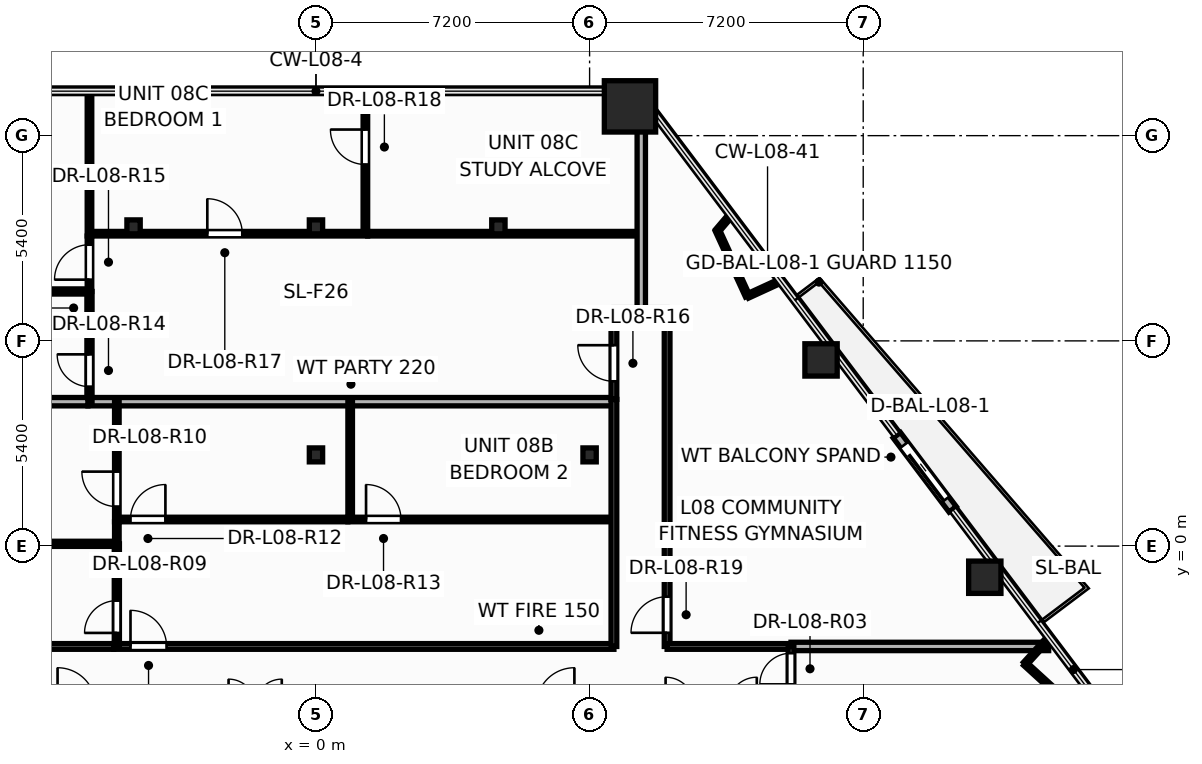
"""IFC4 building model, lengths in metres.
Left out: names, types, materials, properties, quantities, classifications, styles, units other than length and angle.
Written with IfcOpenShell. Run it as: python <this file> out.ifc"""

import sys

from ifc_helpers import new_model, si_unit, direction, frame, frame_2d, origin, origin_2d, place, context, subcontext, project, spatial, rectangle, hollow_rectangle, hollow_circle, i_section, extrude, element, fill, save


model = new_model("IFC4")
c1 = context("Model", 3, precision=1e-05, world=origin(), true_north=direction((0.0, 1.0)))
c2 = subcontext(c1, "Body", "Model", "MODEL_VIEW")
j1 = project(units=[si_unit("LENGTHUNIT", "METRE"), si_unit("PLANEANGLEUNIT", "RADIAN")], contexts=[c1])
p1 = place(None, origin())
s1 = spatial("IfcSite", under=j1, at=p1, CompositionType="ELEMENT")
p2 = place(p1, origin())
s2 = spatial("IfcBuilding", under=s1, at=p2, CompositionType="ELEMENT")
p3 = place(p2, frame((0.0, 0.0, 35.1)))
s3 = spatial("IfcBuildingStorey", under=s2, at=p3, CompositionType="ELEMENT", Elevation=35.1)
p4 = place(p3, frame((8.263, 11.57, 0.0), z_axis=(0.0, 0.0, 1.0), x_axis=(1.0, 0.0, 0.0)))
e1 = element("IfcColumn", 1, at=p4, inside=s3, PredefinedType="COLUMN", context=c2, shape_type="SweptSolid", body=[
    extrude(hollow_rectangle(XDim=1.35, YDim=1.35, WallThickness=0.065, at=origin_2d()), origin(), (0.0, 0.0, 1.0), 3.6),
])
for number, where, z_axis, x_axis in (
    (2, (17.599, -0.819, 0.0), (0.0, 0.0, 1.0), (1.0, 0.0, 0.0)),
    (3, (13.29, 4.899, 0.0), (0.0, 0.0, 1.0), (1.0, 0.0, 0.0)),
):
    element("IfcColumn", number, at=place(p3, frame(where, z_axis=z_axis, x_axis=x_axis)), inside=s3, PredefinedType="COLUMN", context=c2, shape_type="SweptSolid", body=[
        extrude(hollow_circle(Radius=0.425, WallThickness=0.038, at=origin_2d()), origin(), (0.0, 0.0, 1.0), 3.6),
    ])
for number, where, z_axis, x_axis in (
    (4, (0.0, 2.4, 0.0), (0.0, 0.0, 1.0), (1.0, 0.0, 0.0)),
    (5, (7.2, 2.4, 0.0), (0.0, 0.0, 1.0), (1.0, 0.0, 0.0)),
    (6, (-4.8, 8.4, 0.0), (0.0, 0.0, 1.0), (1.0, 0.0, 0.0)),
    (7, (0.0, 8.4, 0.0), (0.0, 0.0, 1.0), (1.0, 0.0, 0.0)),
    (8, (4.8, 8.4, 0.0), (0.0, 0.0, 1.0), (1.0, 0.0, 0.0)),
):
    element("IfcColumn", number, at=place(p3, frame(where, z_axis=z_axis, x_axis=x_axis)), inside=s3, PredefinedType="COLUMN", context=c2, shape_type="SweptSolid", body=[
        extrude(i_section(OverallWidth=0.35, OverallDepth=0.367, WebThickness=0.025, FlangeThickness=0.032, at=origin_2d()), origin(), (0.0, 0.0, 1.0), 3.6),
    ])
p5 = place(p3, frame((16.753, 0.969, -0.015), z_axis=(0.0, 0.0, 1.0), x_axis=(-0.601871511513, 0.798592939882, 0.0)))
e9 = element("IfcWall", 9, at=p5, inside=s3, PredefinedType="STANDARD", context=c2, shape_type="SweptSolid", body=[
    extrude(rectangle(XDim=2.44, YDim=0.24, at=frame_2d((1.22, 0.0))), origin(), (0.0, 0.0, 1.0), 2.729),
])
p6 = place(p5, frame((0.32, 0.0, 0.015)))
e10 = element("IfcOpeningElement", 10, at=p6, cuts=e9, PredefinedType="OPENING", context=c2, shape_type="SweptSolid", body=[
    extrude(rectangle(XDim=1.806, YDim=2.204, at=frame_2d((0.9, 1.102))), frame((0.0, 0.13, 0.0), z_axis=(0.0, -1.0, 0.0), x_axis=(1.0, 0.0, 0.0)), (0.0, 0.0, 1.0), 0.26),
])
p7 = place(p3, frame((-5.32, -2.64, 0.0), z_axis=(0.0, 0.0, 1.0), x_axis=(1.0, 0.0, 0.0)))
e11 = element("IfcWall", 11, at=p7, inside=s3, PredefinedType="PARTITIONING", context=c2, shape_type="SweptSolid", body=[
    extrude(rectangle(XDim=13.16, YDim=0.15, at=frame_2d((6.58, 0.0))), origin(), (0.0, 0.0, 1.0), 2.325),
])
p8 = place(p7, frame((0.439, 0.0, 0.0)))
e12 = element("IfcOpeningElement", 12, at=p8, cuts=e11, PredefinedType="OPENING", context=c2, shape_type="SweptSolid", body=[
    extrude(rectangle(XDim=0.956, YDim=2.104, at=frame_2d((0.475, 1.052))), frame((0.0, 0.085, 0.0), z_axis=(0.0, -1.0, 0.0), x_axis=(1.0, 0.0, 0.0)), (0.0, 0.0, 1.0), 0.17),
])
p9 = place(p3, frame((9.24, -2.64, 0.0), z_axis=(0.0, 0.0, 1.0), x_axis=(0.0, 1.0, 0.0)))
e13 = element("IfcWall", 13, at=p9, inside=s3, PredefinedType="PARTITIONING", context=c2, shape_type="SweptSolid", body=[
    extrude(rectangle(XDim=8.84, YDim=0.15, at=frame_2d((4.42, 0.0))), origin(), (0.0, 0.0, 1.0), 2.325),
])
p10 = place(p9, frame((0.359, 0.0, 0.0)))
e14 = element("IfcOpeningElement", 14, at=p10, cuts=e13, PredefinedType="OPENING", context=c2, shape_type="SweptSolid", body=[
    extrude(rectangle(XDim=0.956, YDim=2.104, at=frame_2d((0.475, 1.052))), frame((0.0, 0.085, 0.0), z_axis=(0.0, -1.0, 0.0), x_axis=(1.0, 0.0, 0.0)), (0.0, 0.0, 1.0), 0.17),
])
p11 = place(p3, frame((-5.96, 8.22, 0.0), z_axis=(0.0, 0.0, 1.0), x_axis=(1.0, 0.0, 0.0)))
e15 = element("IfcWall", 15, at=p11, inside=s3, PredefinedType="PARTITIONING", context=c2, shape_type="SweptSolid", body=[
    extrude(rectangle(XDim=7.32, YDim=0.12, at=frame_2d((3.66, 0.0))), origin(), (0.0, 0.0, 1.0), 2.325),
])
p12 = place(p11, frame((3.101, 0.0, 0.0)))
e16 = element("IfcOpeningElement", 16, at=p12, cuts=e15, PredefinedType="OPENING", context=c2, shape_type="SweptSolid", body=[
    extrude(rectangle(XDim=0.926, YDim=2.104, at=frame_2d((0.46, 1.052))), frame((0.0, 0.07, 0.0), z_axis=(0.0, -1.0, 0.0), x_axis=(1.0, 0.0, 0.0)), (0.0, 0.0, 1.0), 0.14),
])
p13 = place(p3, frame((1.362, 8.22, 0.0), z_axis=(0.0, 0.0, 1.0), x_axis=(1.0, 0.0, 0.0)))
e17 = element("IfcWall", 17, at=p13, inside=s3, PredefinedType="PARTITIONING", context=c2, shape_type="SweptSolid", body=[
    extrude(rectangle(XDim=7.198, YDim=0.12, at=frame_2d((3.599, 0.0))), origin(), (0.0, 0.0, 1.0), 2.325),
])
p14 = place(p3, frame((0.84, 0.7, 0.0), z_axis=(0.0, 0.0, 1.0), x_axis=(1.0, 0.0, 0.0)))
e18 = element("IfcWall", 18, at=p14, inside=s3, PredefinedType="PARTITIONING", context=c2, shape_type="SweptSolid", body=[
    extrude(rectangle(XDim=7.0, YDim=0.12, at=frame_2d((3.5, 0.0))), origin(), (0.0, 0.0, 1.0), 2.325),
])
p15 = place(p14, frame((0.478, 0.0, 0.0)))
e19 = element("IfcOpeningElement", 19, at=p15, cuts=e18, PredefinedType="OPENING", context=c2, shape_type="SweptSolid", body=[
    extrude(rectangle(XDim=0.926, YDim=2.104, at=frame_2d((0.46, 1.052))), frame((0.0, 0.07, 0.0), z_axis=(0.0, -1.0, 0.0), x_axis=(1.0, 0.0, 0.0)), (0.0, 0.0, 1.0), 0.14),
])
p16 = place(p3, frame((-6.0, 3.8, 0.0), z_axis=(0.0, 0.0, 1.0), x_axis=(1.0, 0.0, 0.0)))
e20 = element("IfcWall", 20, at=p16, inside=s3, PredefinedType="PARTITIONING", context=c2, shape_type="SweptSolid", body=[
    extrude(rectangle(XDim=13.84, YDim=0.22, at=frame_2d((6.92, 0.0))), origin(), (0.0, 0.0, 1.0), 2.325),
])
p17 = place(p3, frame((12.5, -2.64, 0.0), z_axis=(0.0, 0.0, 1.0), x_axis=(1.0, 0.0, 0.0)))
e21 = element("IfcWall", 21, at=p17, inside=s3, PredefinedType="PARTITIONING", context=c2, shape_type="SweptSolid", body=[
    extrude(rectangle(XDim=6.78, YDim=0.22, at=frame_2d((3.39, 0.0))), origin(), (0.0, 0.0, 1.0), 2.713),
])
p18 = place(p3, frame((-5.24, 0.7, 0.0), z_axis=(0.0, 0.0, 1.0), x_axis=(1.0, 0.0, 0.0)))
e22 = element("IfcWall", 22, at=p18, inside=s3, PredefinedType="PARTITIONING", context=c2, shape_type="SweptSolid", body=[
    extrude(rectangle(XDim=6.078, YDim=0.12, at=frame_2d((3.039, 0.0))), origin(), (0.0, 0.0, 1.0), 2.325),
])
p19 = place(p18, frame((0.358, 0.0, 0.0)))
e23 = element("IfcOpeningElement", 23, at=p19, cuts=e22, PredefinedType="OPENING", context=c2, shape_type="SweptSolid", body=[
    extrude(rectangle(XDim=0.926, YDim=2.104, at=frame_2d((0.46, 1.052))), frame((0.0, 0.07, 0.0), z_axis=(0.0, -1.0, 0.0), x_axis=(1.0, 0.0, 0.0)), (0.0, 0.0, 1.0), 0.14),
])
p20 = place(p3, frame((-5.96, 8.16, 0.0), z_axis=(0.0, 0.0, 1.0), x_axis=(0.0, 1.0, 0.0)))
e24 = element("IfcWall", 24, at=p20, inside=s3, PredefinedType="PARTITIONING", context=c2, shape_type="SweptSolid", body=[
    extrude(rectangle(XDim=3.811, YDim=0.12, at=frame_2d((1.905, 0.0))), origin(), (0.0, 0.0, 1.0), 2.325),
])
p21 = place(p3, frame((1.3, 8.22, 0.0), z_axis=(0.0, 0.0, 1.0), x_axis=(0.0, 1.0, 0.0)))
e25 = element("IfcWall", 25, at=p21, inside=s3, PredefinedType="PARTITIONING", context=c2, shape_type="SweptSolid", body=[
    extrude(rectangle(XDim=3.75, YDim=0.12, at=frame_2d((1.875, 0.0))), origin(), (0.0, 0.0, 1.0), 2.325),
])
p22 = place(p21, frame((1.821, 0.0, 0.0)))
e26 = element("IfcOpeningElement", 26, at=p22, cuts=e25, PredefinedType="OPENING", context=c2, shape_type="SweptSolid", body=[
    extrude(rectangle(XDim=0.926, YDim=2.104, at=frame_2d((0.46, 1.052))), frame((0.0, 0.07, 0.0), z_axis=(0.0, -1.0, 0.0), x_axis=(1.0, 0.0, 0.0)), (0.0, 0.0, 1.0), 0.14),
])
p23 = place(p3, frame((8.56, 6.2, 0.0), z_axis=(0.0, 0.0, 1.0), x_axis=(0.0, 1.0, 0.0)))
e27 = element("IfcWall", 27, at=p23, inside=s3, PredefinedType="PARTITIONING", context=c2, shape_type="SweptSolid", body=[
    extrude(rectangle(XDim=5.641, YDim=0.22, at=frame_2d((2.821, 0.0))), origin(), (0.0, 0.0, 1.0), 2.325),
])
p24 = place(p3, frame((7.84, -2.64, 0.0), z_axis=(0.0, 0.0, 1.0), x_axis=(0.0, 1.0, 0.0)))
e28 = element("IfcWall", 28, at=p24, inside=s3, PredefinedType="PARTITIONING", context=c2, shape_type="SweptSolid", body=[
    extrude(rectangle(XDim=6.5, YDim=0.15, at=frame_2d((3.25, 0.0))), origin(), (0.0, 0.0, 1.0), 2.325),
])
p25 = place(p3, frame((9.24, -2.64, 0.0), z_axis=(0.0, 0.0, 1.0), x_axis=(1.0, 0.0, 0.0)))
e29 = element("IfcWall", 29, at=p25, inside=s3, PredefinedType="PARTITIONING", context=c2, shape_type="SweptSolid", body=[
    extrude(rectangle(XDim=3.26, YDim=0.15, at=frame_2d((1.63, 0.0))), origin(), (0.0, 0.0, 1.0), 3.35),
])
p26 = place(p3, frame((-5.24, 0.64, 0.0), z_axis=(0.0, 0.0, 1.0), x_axis=(0.0, 1.0, 0.0)))
e30 = element("IfcWall", 30, at=p26, inside=s3, PredefinedType="PARTITIONING", context=c2, shape_type="SweptSolid", body=[
    extrude(rectangle(XDim=3.16, YDim=0.12, at=frame_2d((1.58, 0.0))), origin(), (0.0, 0.0, 1.0), 2.325),
])
p27 = place(p26, frame((0.4, 0.0, 0.0)))
e31 = element("IfcOpeningElement", 31, at=p27, cuts=e30, PredefinedType="OPENING", context=c2, shape_type="SweptSolid", body=[
    extrude(rectangle(XDim=0.926, YDim=2.104, at=frame_2d((0.46, 1.052))), frame((0.0, 0.07, 0.0), z_axis=(0.0, -1.0, 0.0), x_axis=(1.0, 0.0, 0.0)), (0.0, 0.0, 1.0), 0.14),
])
p28 = place(p3, frame((0.9, 0.7, 0.0), z_axis=(0.0, 0.0, 1.0), x_axis=(0.0, 1.0, 0.0)))
e32 = element("IfcWall", 32, at=p28, inside=s3, PredefinedType="PARTITIONING", context=c2, shape_type="SweptSolid", body=[
    extrude(rectangle(XDim=3.1, YDim=0.12, at=frame_2d((1.55, 0.0))), origin(), (0.0, 0.0, 1.0), 2.325),
])
p29 = place(p3, frame((-5.96, 3.8, 0.0), z_axis=(0.0, 0.0, 1.0), x_axis=(0.0, 1.0, 0.0)))
e33 = element("IfcWall", 33, at=p29, inside=s3, PredefinedType="PARTITIONING", context=c2, shape_type="SweptSolid", body=[
    extrude(rectangle(XDim=2.9, YDim=0.135, at=frame_2d((1.45, 0.0))), origin(), (0.0, 0.0, 1.0), 2.325),
])
p30 = place(p29, frame((0.396, 0.0, 0.0)))
e34 = element("IfcOpeningElement", 34, at=p30, cuts=e33, PredefinedType="OPENING", context=c2, shape_type="SweptSolid", body=[
    extrude(rectangle(XDim=0.856, YDim=2.104, at=frame_2d((0.425, 1.052))), frame((0.0, 0.078, 0.0), z_axis=(0.0, -1.0, 0.0), x_axis=(1.0, 0.0, 0.0)), (0.0, 0.0, 1.0), 0.155),
])
p31 = place(p3, frame((-5.24, -2.64, 0.0), z_axis=(0.0, 0.0, 1.0), x_axis=(0.0, 1.0, 0.0)))
e35 = element("IfcWall", 35, at=p31, inside=s3, PredefinedType="PARTITIONING", context=c2, shape_type="SweptSolid", body=[
    extrude(rectangle(XDim=2.7, YDim=0.135, at=frame_2d((1.35, 0.0))), origin(), (0.0, 0.0, 1.0), 3.35),
])
p32 = place(p31, frame((0.356, 0.0, 0.0)))
e36 = element("IfcOpeningElement", 36, at=p32, cuts=e35, PredefinedType="OPENING", context=c2, shape_type="SweptSolid", body=[
    extrude(rectangle(XDim=0.856, YDim=2.104, at=frame_2d((0.425, 1.052))), frame((0.0, 0.078, 0.0), z_axis=(0.0, -1.0, 0.0), x_axis=(1.0, 0.0, 0.0)), (0.0, 0.0, 1.0), 0.155),
])
p33 = place(p3, frame((-7.84, -2.64, 0.0), z_axis=(0.0, 0.0, 1.0), x_axis=(1.0, 0.0, 0.0)))
e37 = element("IfcWall", 37, at=p33, inside=s3, PredefinedType="PARTITIONING", context=c2, shape_type="SweptSolid", body=[
    extrude(rectangle(XDim=2.518, YDim=0.15, at=frame_2d((1.259, 0.0))), origin(), (0.0, 0.0, 1.0), 2.325),
])
for number, where, z_axis, x_axis in (
    (38, (-8.56, 6.7, 0.0), (0.0, 0.0, 1.0), (1.0, 0.0, 0.0)),
    (39, (-7.84, 0.06, 0.0), (0.0, 0.0, 1.0), (1.0, 0.0, 0.0)),
):
    element("IfcWall", number, at=place(p3, frame(where, z_axis=z_axis, x_axis=x_axis)), inside=s3, PredefinedType="PARTITIONING", context=c2, shape_type="SweptSolid", body=[
        extrude(rectangle(XDim=2.6, YDim=0.135, at=frame_2d((1.3, 0.0))), origin(), (0.0, 0.0, 1.0), 2.325),
    ])
p34 = place(p3, frame((7.84, 3.862, 0.0), z_axis=(0.0, 0.0, 1.0), x_axis=(0.0, 1.0, 0.0)))
e40 = element("IfcWall", 40, at=p34, inside=s3, PredefinedType="PARTITIONING", context=c2, shape_type="SweptSolid", body=[
    extrude(rectangle(XDim=2.338, YDim=0.15, at=frame_2d((1.169, 0.0))), origin(), (0.0, 0.0, 1.0), 3.35),
])
p35 = place(p34, frame((0.474, 0.0, 0.0)))
e41 = element("IfcOpeningElement", 41, at=p35, cuts=e40, PredefinedType="OPENING", context=c2, shape_type="SweptSolid", body=[
    extrude(rectangle(XDim=0.956, YDim=2.104, at=frame_2d((0.475, 1.052))), frame((0.0, 0.085, 0.0), z_axis=(0.0, -1.0, 0.0), x_axis=(1.0, 0.0, 0.0)), (0.0, 0.0, 1.0), 0.17),
])
p36 = place(p3, frame((20.148, -4.452, 0.0), z_axis=(0.0, 0.0, 1.0), x_axis=(-0.738587935194, 0.674157149325, 0.0)))
e42 = element("IfcWall", 42, at=p36, inside=s3, PredefinedType="PARTITIONING", context=c2, shape_type="SweptSolid", body=[
    extrude(rectangle(XDim=2.012, YDim=0.12, at=frame_2d((1.006, 0.0))), origin(), (0.0, 0.0, 1.0), 3.35),
])
p37 = place(p3, frame((-7.84, 3.8, 0.0), z_axis=(0.0, 0.0, 1.0), x_axis=(1.0, 0.0, 0.0)))
e43 = element("IfcWall", 43, at=p37, inside=s3, PredefinedType="PARTITIONING", context=c2, shape_type="SweptSolid", body=[
    extrude(rectangle(XDim=1.838, YDim=0.22, at=frame_2d((0.919, 0.0))), origin(), (0.0, 0.0, 1.0), 2.325),
])
p38 = place(p3, frame((11.356, 6.579, 0.0), z_axis=(0.0, 0.0, 1.0), x_axis=(-0.417514536704, 0.90867024362, 0.0)))
e44 = element("IfcWall", 44, at=p38, inside=s3, PredefinedType="PARTITIONING", context=c2, shape_type="SweptSolid", body=[
    extrude(rectangle(XDim=1.896, YDim=0.12, at=frame_2d((0.948, 0.0))), origin(), (0.0, 0.0, 1.0), 3.35),
])
p39 = place(p3, frame((12.5, -4.24, 0.0), z_axis=(0.0, 0.0, 1.0), x_axis=(0.0, 1.0, 0.0)))
e45 = element("IfcWall", 45, at=p39, inside=s3, PredefinedType="PARTITIONING", context=c2, shape_type="SweptSolid", body=[
    extrude(rectangle(XDim=1.6, YDim=0.15, at=frame_2d((0.8, 0.0))), origin(), (0.0, 0.0, 1.0), 2.325),
])
p40 = place(p39, frame((0.602, 0.0, 0.0)))
e46 = element("IfcOpeningElement", 46, at=p40, cuts=e45, PredefinedType="OPENING", context=c2, shape_type="SweptSolid", body=[
    extrude(rectangle(XDim=0.826, YDim=2.104, at=frame_2d((0.41, 1.052))), frame((0.0, 0.085, 0.0), z_axis=(0.0, -1.0, 0.0), x_axis=(1.0, 0.0, 0.0)), (0.0, 0.0, 1.0), 0.17),
])
p41 = place(p3, frame((-5.96, 6.7, 0.0), z_axis=(0.0, 0.0, 1.0), x_axis=(0.0, 1.0, 0.0)))
e47 = element("IfcWall", 47, at=p41, inside=s3, PredefinedType="PARTITIONING", context=c2, shape_type="SweptSolid", body=[
    extrude(rectangle(XDim=1.458, YDim=0.12, at=frame_2d((0.729, 0.0))), origin(), (0.0, 0.0, 1.0), 2.325),
])
p42 = place(p41, frame((0.311, 0.0, 0.0)))
e48 = element("IfcOpeningElement", 48, at=p42, cuts=e47, PredefinedType="OPENING", context=c2, shape_type="SweptSolid", body=[
    extrude(rectangle(XDim=0.926, YDim=2.104, at=frame_2d((0.46, 1.052))), frame((0.0, 0.07, 0.0), z_axis=(0.0, -1.0, 0.0), x_axis=(1.0, 0.0, 0.0)), (0.0, 0.0, 1.0), 0.14),
])
p43 = place(p3, frame((12.215, 6.974, 0.0), z_axis=(0.0, 0.0, 1.0), x_axis=(-0.908713919018, -0.417419469339, 0.0)))
e49 = element("IfcWall", 49, at=p43, inside=s3, PredefinedType="PARTITIONING", context=c2, shape_type="SweptSolid", body=[
    extrude(rectangle(XDim=0.945, YDim=0.12, at=frame_2d((0.473, 0.0))), origin(), (0.0, 0.0, 1.0), 2.713),
])
p44 = place(p3, frame((18.662, -3.096, 0.0), z_axis=(0.0, 0.0, 1.0), x_axis=(0.674125797279, 0.738616551021, 0.0)))
e50 = element("IfcWall", 50, at=p44, inside=s3, PredefinedType="PARTITIONING", context=c2, shape_type="SweptSolid", body=[
    extrude(rectangle(XDim=0.927, YDim=0.12, at=frame_2d((0.464, 0.0))), origin(), (0.0, 0.0, 1.0), 2.713),
])
p45 = place(p3, frame((7.84, 6.2, 0.0), z_axis=(0.0, 0.0, 1.0), x_axis=(1.0, 0.0, 0.0)))
e51 = element("IfcWall", 51, at=p45, inside=s3, PredefinedType="PARTITIONING", context=c2, shape_type="SweptSolid", body=[
    extrude(rectangle(XDim=1.4, YDim=0.15, at=frame_2d((0.7, 0.0))), origin(), (0.0, 0.0, 1.0), 3.35),
])
p46 = place(p3, frame((-5.24, 0.06, 0.0), z_axis=(0.0, 0.0, 1.0), x_axis=(0.0, 1.0, 0.0)))
e52 = element("IfcWall", 52, at=p46, inside=s3, PredefinedType="PARTITIONING", context=c2, shape_type="SweptSolid", body=[
    extrude(rectangle(XDim=0.578, YDim=0.12, at=frame_2d((0.289, 0.0))), origin(), (0.0, 0.0, 1.0), 3.35),
])
p47 = place(p3, frame((10.565, 8.302, 0.0), z_axis=(0.0, 0.0, 1.0), x_axis=(0.648594610132, 0.761134043193, 0.0)))
e53 = element("IfcWall", 53, at=p47, inside=s3, PredefinedType="PARTITIONING", context=c2, shape_type="SweptSolid", body=[
    extrude(rectangle(XDim=0.531, YDim=0.12, at=frame_2d((0.266, 0.0))), origin(), (0.0, 0.0, 1.0), 2.713),
])
p48 = place(p6, origin())
e54 = element("IfcDoor", 54, at=p48, inside=s3, OperationType="SLIDING_TO_LEFT", PredefinedType="DOOR", context=c2, shape_type="SweptSolid", body=[
    extrude(rectangle(XDim=1.8, YDim=2.2, at=frame_2d((0.9, 1.1))), frame((0.0, 0.025, 0.0), z_axis=(0.0, -1.0, 0.0), x_axis=(1.0, 0.0, 0.0)), (0.0, 0.0, 1.0), 0.05),
])
fill(e10, e54)
p49 = place(p40, origin())
e55 = element("IfcDoor", 55, at=p49, inside=s3, OperationType="SINGLE_SWING_LEFT", PredefinedType="DOOR", context=c2, shape_type="SweptSolid", body=[
    extrude(rectangle(XDim=0.82, YDim=2.1, at=frame_2d((0.41, 1.05))), frame((0.0, 0.025, 0.0), z_axis=(0.0, -1.0, 0.0), x_axis=(1.0, 0.0, 0.0)), (0.0, 0.0, 1.0), 0.05),
])
fill(e46, e55)
p50 = place(p32, origin())
e56 = element("IfcDoor", 56, at=p50, inside=s3, OperationType="SINGLE_SWING_LEFT", PredefinedType="DOOR", context=c2, shape_type="SweptSolid", body=[
    extrude(rectangle(XDim=0.85, YDim=2.1, at=frame_2d((0.425, 1.05))), frame((0.0, 0.025, 0.0), z_axis=(0.0, -1.0, 0.0), x_axis=(1.0, 0.0, 0.0)), (0.0, 0.0, 1.0), 0.05),
])
fill(e36, e56)
p51 = place(p27, origin())
e57 = element("IfcDoor", 57, at=p51, inside=s3, OperationType="SINGLE_SWING_RIGHT", PredefinedType="DOOR", context=c2, shape_type="SweptSolid", body=[
    extrude(rectangle(XDim=0.92, YDim=2.1, at=frame_2d((0.46, 1.05))), frame((0.0, 0.025, 0.0), z_axis=(0.0, -1.0, 0.0), x_axis=(1.0, 0.0, 0.0)), (0.0, 0.0, 1.0), 0.05),
])
fill(e31, e57)
p52 = place(p8, origin())
e58 = element("IfcDoor", 58, at=p52, inside=s3, OperationType="SINGLE_SWING_LEFT", PredefinedType="DOOR", context=c2, shape_type="SweptSolid", body=[
    extrude(rectangle(XDim=0.95, YDim=2.1, at=frame_2d((0.475, 1.05))), frame((0.0, 0.025, 0.0), z_axis=(0.0, -1.0, 0.0), x_axis=(1.0, 0.0, 0.0)), (0.0, 0.0, 1.0), 0.05),
])
fill(e12, e58)
p53 = place(p19, origin())
e59 = element("IfcDoor", 59, at=p53, inside=s3, OperationType="SINGLE_SWING_RIGHT", PredefinedType="DOOR", context=c2, shape_type="SweptSolid", body=[
    extrude(rectangle(XDim=0.92, YDim=2.1, at=frame_2d((0.46, 1.05))), frame((0.0, 0.025, 0.0), z_axis=(0.0, -1.0, 0.0), x_axis=(1.0, 0.0, 0.0)), (0.0, 0.0, 1.0), 0.05),
])
fill(e23, e59)
p54 = place(p15, origin())
e60 = element("IfcDoor", 60, at=p54, inside=s3, OperationType="SINGLE_SWING_LEFT", PredefinedType="DOOR", context=c2, shape_type="SweptSolid", body=[
    extrude(rectangle(XDim=0.92, YDim=2.1, at=frame_2d((0.46, 1.05))), frame((0.0, 0.025, 0.0), z_axis=(0.0, -1.0, 0.0), x_axis=(1.0, 0.0, 0.0)), (0.0, 0.0, 1.0), 0.05),
])
fill(e19, e60)
p55 = place(p30, origin())
e61 = element("IfcDoor", 61, at=p55, inside=s3, OperationType="SINGLE_SWING_RIGHT", PredefinedType="DOOR", context=c2, shape_type="SweptSolid", body=[
    extrude(rectangle(XDim=0.85, YDim=2.1, at=frame_2d((0.425, 1.05))), frame((0.0, 0.025, 0.0), z_axis=(0.0, -1.0, 0.0), x_axis=(1.0, 0.0, 0.0)), (0.0, 0.0, 1.0), 0.05),
])
fill(e34, e61)
p56 = place(p42, origin())
e62 = element("IfcDoor", 62, at=p56, inside=s3, OperationType="SINGLE_SWING_LEFT", PredefinedType="DOOR", context=c2, shape_type="SweptSolid", body=[
    extrude(rectangle(XDim=0.92, YDim=2.1, at=frame_2d((0.46, 1.05))), frame((0.0, 0.025, 0.0), z_axis=(0.0, -1.0, 0.0), x_axis=(1.0, 0.0, 0.0)), (0.0, 0.0, 1.0), 0.05),
])
fill(e48, e62)
p57 = place(p35, origin())
e63 = element("IfcDoor", 63, at=p57, inside=s3, OperationType="SINGLE_SWING_RIGHT", PredefinedType="DOOR", context=c2, shape_type="SweptSolid", body=[
    extrude(rectangle(XDim=0.95, YDim=2.1, at=frame_2d((0.475, 1.05))), frame((0.0, 0.025, 0.0), z_axis=(0.0, -1.0, 0.0), x_axis=(1.0, 0.0, 0.0)), (0.0, 0.0, 1.0), 0.05),
])
fill(e41, e63)
p58 = place(p12, origin())
e64 = element("IfcDoor", 64, at=p58, inside=s3, OperationType="SINGLE_SWING_LEFT", PredefinedType="DOOR", context=c2, shape_type="SweptSolid", body=[
    extrude(rectangle(XDim=0.92, YDim=2.1, at=frame_2d((0.46, 1.05))), frame((0.0, 0.025, 0.0), z_axis=(0.0, -1.0, 0.0), x_axis=(1.0, 0.0, 0.0)), (0.0, 0.0, 1.0), 0.05),
])
fill(e16, e64)
p59 = place(p22, origin())
e65 = element("IfcDoor", 65, at=p59, inside=s3, OperationType="SINGLE_SWING_RIGHT", PredefinedType="DOOR", context=c2, shape_type="SweptSolid", body=[
    extrude(rectangle(XDim=0.92, YDim=2.1, at=frame_2d((0.46, 1.05))), frame((0.0, 0.025, 0.0), z_axis=(0.0, -1.0, 0.0), x_axis=(1.0, 0.0, 0.0)), (0.0, 0.0, 1.0), 0.05),
])
fill(e26, e65)
p60 = place(p10, origin())
e66 = element("IfcDoor", 66, at=p60, inside=s3, OperationType="SINGLE_SWING_LEFT", PredefinedType="DOOR", context=c2, shape_type="SweptSolid", body=[
    extrude(rectangle(XDim=0.95, YDim=2.1, at=frame_2d((0.475, 1.05))), frame((0.0, 0.025, 0.0), z_axis=(0.0, -1.0, 0.0), x_axis=(1.0, 0.0, 0.0)), (0.0, 0.0, 1.0), 0.05),
])
fill(e14, e66)
save(model, sys.argv[1])
